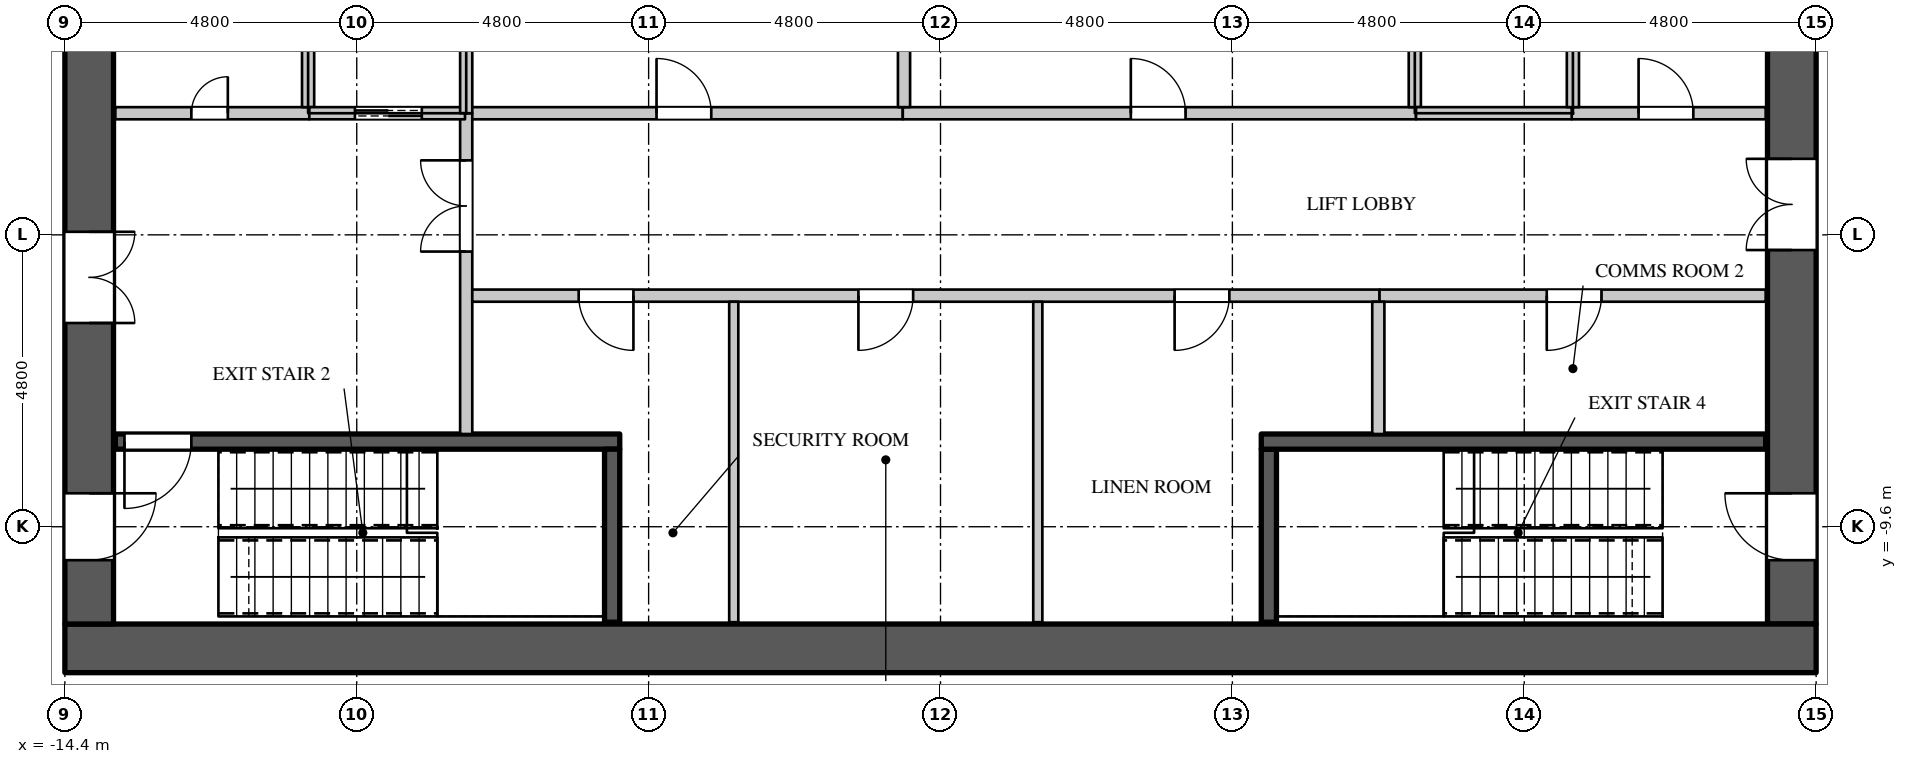
"""IFC4 building model, lengths in metres.
Left out: names, types, materials, properties, quantities, classifications, styles, units other than length and angle.
Written with IfcOpenShell. Run it as: python <this file> out.ifc"""

import sys

from ifc_helpers import new_model, si_unit, direction, frame, frame_2d, origin, place, context, subcontext, project, spatial, rectangle, extrude, element, fill, save


model = new_model("IFC4")
c1 = context("Model", 3, precision=1e-05, world=origin(), true_north=direction((0.0, 1.0)))
c2 = subcontext(c1, "Body", "Model", "MODEL_VIEW")
j1 = project(units=[si_unit("LENGTHUNIT", "METRE"), si_unit("PLANEANGLEUNIT", "RADIAN")], contexts=[c1])
p1 = place(None, origin())
s1 = spatial("IfcSite", under=j1, at=p1, CompositionType="ELEMENT")
p2 = place(p1, origin())
s2 = spatial("IfcBuilding", under=s1, at=p2, CompositionType="ELEMENT")
p3 = place(p2, frame((0.0, 0.0, 119.1)))
s3 = spatial("IfcBuildingStorey", under=s2, at=p3, CompositionType="ELEMENT", Elevation=119.1)
p4 = place(p3, frame((-14.4, -11.6, 0.0), z_axis=(0.0, 0.0, 1.0), x_axis=(1.0, 0.0, 0.0)))
e1 = element("IfcWall", 1, at=p4, inside=s3, PredefinedType="SHEAR", context=c2, shape_type="SweptSolid", body=[
    extrude(rectangle(XDim=28.8, YDim=0.8, at=frame_2d((14.4, 0.0))), origin(), (0.0, 0.0, 1.0), 4.2),
])
p5 = place(p3, frame((14.0, -11.2, 0.0), z_axis=(0.0, 0.0, 1.0), x_axis=(0.0, 1.0, 0.0)))
e2 = element("IfcWall", 2, at=p5, inside=s3, PredefinedType="SHEAR", context=c2, shape_type="SweptSolid", body=[
    extrude(rectangle(XDim=22.4, YDim=0.8, at=frame_2d((11.2, 0.0))), origin(), (0.0, 0.0, 1.0), 4.2),
])
p6 = place(p5, frame((20.25, 0.0, 0.0)))
e3 = element("IfcOpeningElement", 3, at=p6, cuts=e2, PredefinedType="OPENING", context=c2, shape_type="SweptSolid", body=[
    extrude(rectangle(XDim=1.1, YDim=2.2, at=frame_2d((0.55, 1.1))), frame((0.0, 0.41, 0.0), z_axis=(0.0, -1.0, 0.0), x_axis=(1.0, 0.0, 0.0)), (0.0, 0.0, 1.0), 0.82),
])
p7 = place(p5, frame((1.05, 0.0, 0.0)))
e4 = element("IfcOpeningElement", 4, at=p7, cuts=e2, PredefinedType="OPENING", context=c2, shape_type="SweptSolid", body=[
    extrude(rectangle(XDim=1.1, YDim=2.2, at=frame_2d((0.55, 1.1))), frame((0.0, 0.41, 0.0), z_axis=(0.0, -1.0, 0.0), x_axis=(1.0, 0.0, 0.0)), (0.0, 0.0, 1.0), 0.82),
])
p8 = place(p5, frame((14.75, 0.0, 0.0)))
e5 = element("IfcOpeningElement", 5, at=p8, cuts=e2, PredefinedType="OPENING", context=c2, shape_type="SweptSolid", body=[
    extrude(rectangle(XDim=1.5, YDim=2.4, at=frame_2d((0.75, 1.2))), frame((0.0, 0.41, 0.0), z_axis=(0.0, -1.0, 0.0), x_axis=(1.0, 0.0, 0.0)), (0.0, 0.0, 1.0), 0.82),
])
p9 = place(p5, frame((6.15, 0.0, 0.0)))
e6 = element("IfcOpeningElement", 6, at=p9, cuts=e2, PredefinedType="OPENING", context=c2, shape_type="SweptSolid", body=[
    extrude(rectangle(XDim=1.5, YDim=2.4, at=frame_2d((0.75, 1.2))), frame((0.0, 0.41, 0.0), z_axis=(0.0, -1.0, 0.0), x_axis=(1.0, 0.0, 0.0)), (0.0, 0.0, 1.0), 0.82),
])
p10 = place(p3, frame((-14.0, -11.2, 0.0), z_axis=(0.0, 0.0, 1.0), x_axis=(0.0, 1.0, 0.0)))
e7 = element("IfcWall", 7, at=p10, inside=s3, PredefinedType="SHEAR", context=c2, shape_type="SweptSolid", body=[
    extrude(rectangle(XDim=22.4, YDim=0.8, at=frame_2d((11.2, 0.0))), origin(), (0.0, 0.0, 1.0), 4.2),
])
p11 = place(p10, frame((20.25, 0.0, 0.0)))
e8 = element("IfcOpeningElement", 8, at=p11, cuts=e7, PredefinedType="OPENING", context=c2, shape_type="SweptSolid", body=[
    extrude(rectangle(XDim=1.1, YDim=2.2, at=frame_2d((0.55, 1.1))), frame((0.0, 0.41, 0.0), z_axis=(0.0, -1.0, 0.0), x_axis=(1.0, 0.0, 0.0)), (0.0, 0.0, 1.0), 0.82),
])
p12 = place(p10, frame((1.05, 0.0, 0.0)))
e9 = element("IfcOpeningElement", 9, at=p12, cuts=e7, PredefinedType="OPENING", context=c2, shape_type="SweptSolid", body=[
    extrude(rectangle(XDim=1.1, YDim=2.2, at=frame_2d((0.55, 1.1))), frame((0.0, 0.41, 0.0), z_axis=(0.0, -1.0, 0.0), x_axis=(1.0, 0.0, 0.0)), (0.0, 0.0, 1.0), 0.82),
])
p13 = place(p10, frame((15.95, 0.0, 0.0)))
e10 = element("IfcOpeningElement", 10, at=p13, cuts=e7, PredefinedType="OPENING", context=c2, shape_type="SweptSolid", body=[
    extrude(rectangle(XDim=1.5, YDim=2.4, at=frame_2d((0.75, 1.2))), frame((0.0, 0.41, 0.0), z_axis=(0.0, -1.0, 0.0), x_axis=(1.0, 0.0, 0.0)), (0.0, 0.0, 1.0), 0.82),
])
p14 = place(p10, frame((4.95, 0.0, 0.0)))
e11 = element("IfcOpeningElement", 11, at=p14, cuts=e7, PredefinedType="OPENING", context=c2, shape_type="SweptSolid", body=[
    extrude(rectangle(XDim=1.5, YDim=2.4, at=frame_2d((0.75, 1.2))), frame((0.0, 0.41, 0.0), z_axis=(0.0, -1.0, 0.0), x_axis=(1.0, 0.0, 0.0)), (0.0, 0.0, 1.0), 0.82),
])
p15 = place(p3, frame((-7.82, -2.8, 0.0), z_axis=(0.0, 0.0, 1.0), x_axis=(1.0, 0.0, 0.0)))
e12 = element("IfcWall", 12, at=p15, inside=s3, PredefinedType="PARTITIONING", context=c2, shape_type="SweptSolid", body=[
    extrude(rectangle(XDim=7.2, YDim=0.2, at=frame_2d((3.6, 0.0))), origin(), (0.0, 0.0, 1.0), 3.95),
])
p16 = place(p15, frame((3.15, 0.0, 0.0)))
e13 = element("IfcOpeningElement", 13, at=p16, cuts=e12, PredefinedType="OPENING", context=c2, shape_type="SweptSolid", body=[
    extrude(rectangle(XDim=0.9, YDim=2.2, at=frame_2d((0.45, 1.1))), frame((0.0, 0.11, 0.0), z_axis=(0.0, -1.0, 0.0), x_axis=(1.0, 0.0, 0.0)), (0.0, 0.0, 1.0), 0.22),
])
p17 = place(p3, frame((-7.8, -8.075, 0.0), z_axis=(0.0, 0.0, 1.0), x_axis=(0.0, 1.0, 0.0)))
e14 = element("IfcWall", 14, at=p17, inside=s3, PredefinedType="PARTITIONING", context=c2, shape_type="SweptSolid", body=[
    extrude(rectangle(XDim=5.275, YDim=0.2, at=frame_2d((2.637, 0.0))), origin(), (0.0, 0.0, 1.0), 3.95),
])
p18 = place(p17, frame((3.0, 0.0, 0.0)))
e15 = element("IfcOpeningElement", 15, at=p18, cuts=e14, PredefinedType="OPENING", context=c2, shape_type="SweptSolid", body=[
    extrude(rectangle(XDim=1.5, YDim=2.4, at=frame_2d((0.75, 1.2))), frame((0.0, 0.11, 0.0), z_axis=(0.0, -1.0, 0.0), x_axis=(1.0, 0.0, 0.0)), (0.0, 0.0, 1.0), 0.22),
])
p19 = place(p3, frame((-7.7, -5.8, 0.0), z_axis=(0.0, 0.0, 1.0), x_axis=(1.0, 0.0, 0.0)))
e16 = element("IfcWall", 16, at=p19, inside=s3, PredefinedType="PARTITIONING", context=c2, shape_type="SweptSolid", body=[
    extrude(rectangle(XDim=14.92, YDim=0.2, at=frame_2d((7.46, 0.0))), origin(), (0.0, 0.0, 1.0), 3.95),
])
p20 = place(p19, frame((1.75, 0.0, 0.0)))
e17 = element("IfcOpeningElement", 17, at=p20, cuts=e16, PredefinedType="OPENING", context=c2, shape_type="SweptSolid", body=[
    extrude(rectangle(XDim=0.9, YDim=2.2, at=frame_2d((0.45, 1.1))), frame((0.0, 0.11, 0.0), z_axis=(0.0, -1.0, 0.0), x_axis=(1.0, 0.0, 0.0)), (0.0, 0.0, 1.0), 0.22),
])
p21 = place(p19, frame((6.35, 0.0, 0.0)))
e18 = element("IfcOpeningElement", 18, at=p21, cuts=e16, PredefinedType="OPENING", context=c2, shape_type="SweptSolid", body=[
    extrude(rectangle(XDim=0.9, YDim=2.2, at=frame_2d((0.45, 1.1))), frame((0.0, 0.11, 0.0), z_axis=(0.0, -1.0, 0.0), x_axis=(1.0, 0.0, 0.0)), (0.0, 0.0, 1.0), 0.22),
])
p22 = place(p19, frame((11.55, 0.0, 0.0)))
e19 = element("IfcOpeningElement", 19, at=p22, cuts=e16, PredefinedType="OPENING", context=c2, shape_type="SweptSolid", body=[
    extrude(rectangle(XDim=0.9, YDim=2.2, at=frame_2d((0.45, 1.1))), frame((0.0, 0.11, 0.0), z_axis=(0.0, -1.0, 0.0), x_axis=(1.0, 0.0, 0.0)), (0.0, 0.0, 1.0), 0.22),
])
for number, where, z_axis, x_axis in (
    (20, (-3.4, -11.17, 0.0), (0.0, 0.0, 1.0), (0.0, 1.0, 0.0)),
    (21, (1.6, -11.17, 0.0), (0.0, 0.0, 1.0), (0.0, 1.0, 0.0)),
):
    element("IfcWall", number, at=place(p3, frame(where, z_axis=z_axis, x_axis=x_axis)), inside=s3, PredefinedType="PARTITIONING", context=c2, shape_type="SweptSolid", body=[
        extrude(rectangle(XDim=5.27, YDim=0.15, at=frame_2d((2.635, 0.0))), origin(), (0.0, 0.0, 1.0), 3.95),
    ])
p23 = place(p3, frame((-13.57, -2.8, 0.0), z_axis=(0.0, 0.0, 1.0), x_axis=(1.0, 0.0, 0.0)))
e22 = element("IfcWall", 22, at=p23, inside=s3, PredefinedType="PARTITIONING", context=c2, shape_type="SweptSolid", body=[
    extrude(rectangle(XDim=3.19, YDim=0.2, at=frame_2d((1.595, 0.0))), origin(), (0.0, 0.0, 1.0), 3.95),
])
p24 = place(p23, frame((1.25, 0.0, 0.0)))
e23 = element("IfcOpeningElement", 23, at=p24, cuts=e22, PredefinedType="OPENING", context=c2, shape_type="SweptSolid", body=[
    extrude(rectangle(XDim=0.6, YDim=2.0, at=frame_2d((0.3, 1.0))), frame((0.0, 0.11, 0.0), z_axis=(0.0, -1.0, 0.0), x_axis=(1.0, 0.0, 0.0)), (0.0, 0.0, 1.0), 0.22),
])
p25 = place(p3, frame((-0.62, -2.8, 0.0), z_axis=(0.0, 0.0, 1.0), x_axis=(1.0, 0.0, 0.0)))
e24 = element("IfcWall", 24, at=p25, inside=s3, PredefinedType="PARTITIONING", context=c2, shape_type="SweptSolid", body=[
    extrude(rectangle(XDim=8.44, YDim=0.2, at=frame_2d((4.22, 0.0))), origin(), (0.0, 0.0, 1.0), 3.95),
])
p26 = place(p25, frame((3.75, 0.0, 0.0)))
e25 = element("IfcOpeningElement", 25, at=p26, cuts=e24, PredefinedType="OPENING", context=c2, shape_type="SweptSolid", body=[
    extrude(rectangle(XDim=0.9, YDim=2.2, at=frame_2d((0.45, 1.1))), frame((0.0, 0.11, 0.0), z_axis=(0.0, -1.0, 0.0), x_axis=(1.0, 0.0, 0.0)), (0.0, 0.0, 1.0), 0.22),
])
p27 = place(p3, frame((-0.6, -2.7, 0.0), z_axis=(0.0, 0.0, 1.0), x_axis=(0.0, 1.0, 0.0)))
e26 = element("IfcWall", 26, at=p27, inside=s3, PredefinedType="PARTITIONING", context=c2, shape_type="SweptSolid", body=[
    extrude(rectangle(XDim=2.6, YDim=0.2, at=frame_2d((1.3, 0.0))), origin(), (0.0, 0.0, 1.0), 3.95),
])
p28 = place(p3, frame((7.22, -5.8, 0.0), z_axis=(0.0, 0.0, 1.0), x_axis=(1.0, 0.0, 0.0)))
e27 = element("IfcWall", 27, at=p28, inside=s3, PredefinedType="PARTITIONING", context=c2, shape_type="SweptSolid", body=[
    extrude(rectangle(XDim=6.35, YDim=0.2, at=frame_2d((3.175, 0.0))), origin(), (0.0, 0.0, 1.0), 3.95),
])
p29 = place(p28, frame((2.75, 0.0, 0.0)))
e28 = element("IfcOpeningElement", 28, at=p29, cuts=e27, PredefinedType="OPENING", context=c2, shape_type="SweptSolid", body=[
    extrude(rectangle(XDim=0.9, YDim=2.2, at=frame_2d((0.45, 1.1))), frame((0.0, 0.11, 0.0), z_axis=(0.0, -1.0, 0.0), x_axis=(1.0, 0.0, 0.0)), (0.0, 0.0, 1.0), 0.22),
])
p30 = place(p3, frame((7.2, -8.075, 0.0), z_axis=(0.0, 0.0, 1.0), x_axis=(0.0, 1.0, 0.0)))
e29 = element("IfcWall", 29, at=p30, inside=s3, PredefinedType="PARTITIONING", context=c2, shape_type="SweptSolid", body=[
    extrude(rectangle(XDim=2.175, YDim=0.2, at=frame_2d((1.087, 0.0))), origin(), (0.0, 0.0, 1.0), 3.95),
])
p31 = place(p3, frame((10.38, -2.8, 0.0), z_axis=(0.0, 0.0, 1.0), x_axis=(1.0, 0.0, 0.0)))
e30 = element("IfcWall", 30, at=p31, inside=s3, PredefinedType="PARTITIONING", context=c2, shape_type="SweptSolid", body=[
    extrude(rectangle(XDim=3.19, YDim=0.2, at=frame_2d((1.595, 0.0))), origin(), (0.0, 0.0, 1.0), 3.95),
])
p32 = place(p31, frame((1.1, 0.0, 0.0)))
e31 = element("IfcOpeningElement", 31, at=p32, cuts=e30, PredefinedType="OPENING", context=c2, shape_type="SweptSolid", body=[
    extrude(rectangle(XDim=0.9, YDim=2.2, at=frame_2d((0.45, 1.1))), frame((0.0, 0.11, 0.0), z_axis=(0.0, -1.0, 0.0), x_axis=(1.0, 0.0, 0.0)), (0.0, 0.0, 1.0), 0.22),
])
p33 = place(p3, frame((-10.4, -2.7, 0.0), z_axis=(0.0, 0.0, 1.0), x_axis=(0.0, 1.0, 0.0)))
e32 = element("IfcWall", 32, at=p33, inside=s3, PredefinedType="PARTITIONING", context=c2, shape_type="SweptSolid", body=[
    extrude(rectangle(XDim=2.7, YDim=0.2, at=frame_2d((1.35, 0.0))), origin(), (0.0, 0.0, 1.0), 3.95),
])
p34 = place(p3, frame((-10.38, -2.8, 0.0), z_axis=(0.0, 0.0, 1.0), x_axis=(1.0, 0.0, 0.0)))
e33 = element("IfcWall", 33, at=p34, inside=s3, PredefinedType="PARTITIONING", context=c2, shape_type="SweptSolid", body=[
    extrude(rectangle(XDim=2.56, YDim=0.2, at=frame_2d((1.28, 0.0))), origin(), (0.0, 0.0, 1.0), 3.95),
])
p35 = place(p34, frame((0.75, 0.0, 0.0)))
e34 = element("IfcOpeningElement", 34, at=p35, cuts=e33, PredefinedType="OPENING", context=c2, shape_type="SweptSolid", body=[
    extrude(rectangle(XDim=1.1, YDim=2.2, at=frame_2d((0.55, 1.1))), frame((0.0, 0.11, 0.0), z_axis=(0.0, -1.0, 0.0), x_axis=(1.0, 0.0, 0.0)), (0.0, 0.0, 1.0), 0.22),
])
p36 = place(p3, frame((-7.8, -2.8, 0.0), z_axis=(0.0, 0.0, 1.0), x_axis=(0.0, 1.0, 0.0)))
e35 = element("IfcWall", 35, at=p36, inside=s3, PredefinedType="PARTITIONING", context=c2, shape_type="SweptSolid", body=[
    extrude(rectangle(XDim=2.8, YDim=0.2, at=frame_2d((1.4, 0.0))), origin(), (0.0, 0.0, 1.0), 3.95),
])
p37 = place(p3, frame((7.8, -2.7, 0.0), z_axis=(0.0, 0.0, 1.0), x_axis=(0.0, 1.0, 0.0)))
e36 = element("IfcWall", 36, at=p37, inside=s3, PredefinedType="PARTITIONING", context=c2, shape_type="SweptSolid", body=[
    extrude(rectangle(XDim=2.7, YDim=0.2, at=frame_2d((1.35, 0.0))), origin(), (0.0, 0.0, 1.0), 3.95),
])
p38 = place(p3, frame((7.82, -2.8, 0.0), z_axis=(0.0, 0.0, 1.0), x_axis=(1.0, 0.0, 0.0)))
e37 = element("IfcWall", 37, at=p38, inside=s3, PredefinedType="PARTITIONING", context=c2, shape_type="SweptSolid", body=[
    extrude(rectangle(XDim=2.56, YDim=0.2, at=frame_2d((1.28, 0.0))), origin(), (0.0, 0.0, 1.0), 3.95),
])
p39 = place(p3, frame((10.4, -2.7, 0.0), z_axis=(0.0, 0.0, 1.0), x_axis=(0.0, 1.0, 0.0)))
e38 = element("IfcWall", 38, at=p39, inside=s3, PredefinedType="PARTITIONING", context=c2, shape_type="SweptSolid", body=[
    extrude(rectangle(XDim=5.4, YDim=0.2, at=frame_2d((2.7, 0.0))), origin(), (0.0, 0.0, 1.0), 3.95),
])
p40 = place(p3, frame((-13.57, -8.2, 0.0), z_axis=(0.0, 0.0, 1.0), x_axis=(1.0, 0.0, 0.0)))
e39 = element("IfcWall", 39, at=p40, inside=s3, PredefinedType="SHEAR", context=c2, shape_type="SweptSolid", body=[
    extrude(rectangle(XDim=8.295, YDim=0.25, at=frame_2d((4.147, 0.0))), origin(), (0.0, 0.0, 1.0), 3.95),
])
p41 = place(p40, frame((0.15, 0.0, 0.0)))
e40 = element("IfcOpeningElement", 40, at=p41, cuts=e39, PredefinedType="OPENING", context=c2, shape_type="SweptSolid", body=[
    extrude(rectangle(XDim=1.1, YDim=2.2, at=frame_2d((0.55, 1.1))), frame((0.0, 0.135, 0.0), z_axis=(0.0, -1.0, 0.0), x_axis=(1.0, 0.0, 0.0)), (0.0, 0.0, 1.0), 0.27),
])
for number, where, z_axis, x_axis in (
    (41, (-5.4, -11.17, 0.0), (0.0, 0.0, 1.0), (0.0, 1.0, 0.0)),
    (42, (5.4, -11.17, 0.0), (0.0, 0.0, 1.0), (0.0, 1.0, 0.0)),
):
    element("IfcWall", number, at=place(p3, frame(where, z_axis=z_axis, x_axis=x_axis)), inside=s3, PredefinedType="SHEAR", context=c2, shape_type="SweptSolid", body=[
        extrude(rectangle(XDim=2.845, YDim=0.25, at=frame_2d((1.422, 0.0))), origin(), (0.0, 0.0, 1.0), 3.95),
    ])
p42 = place(p3, frame((5.275, -8.2, 0.0), z_axis=(0.0, 0.0, 1.0), x_axis=(1.0, 0.0, 0.0)))
e43 = element("IfcWall", 43, at=p42, inside=s3, PredefinedType="SHEAR", context=c2, shape_type="SweptSolid", body=[
    extrude(rectangle(XDim=8.295, YDim=0.25, at=frame_2d((4.147, 0.0))), origin(), (0.0, 0.0, 1.0), 3.95),
])
p43 = place(p24, origin())
e44 = element("IfcDoor", 44, at=p43, inside=s3, OperationType="SINGLE_SWING_RIGHT", PredefinedType="DOOR", context=c2, shape_type="SweptSolid", body=[
    extrude(rectangle(XDim=0.6, YDim=2.0, at=frame_2d((0.3, 1.0))), frame((0.0, 0.025, 0.0), z_axis=(0.0, -1.0, 0.0), x_axis=(1.0, 0.0, 0.0)), (0.0, 0.0, 1.0), 0.05),
])
fill(e23, e44)
p44 = place(p32, origin())
e45 = element("IfcDoor", 45, at=p44, inside=s3, OperationType="SINGLE_SWING_LEFT", PredefinedType="DOOR", context=c2, shape_type="SweptSolid", body=[
    extrude(rectangle(XDim=0.9, YDim=2.2, at=frame_2d((0.45, 1.1))), frame((0.0, 0.025, 0.0), z_axis=(0.0, -1.0, 0.0), x_axis=(1.0, 0.0, 0.0)), (0.0, 0.0, 1.0), 0.05),
])
fill(e31, e45)
p45 = place(p20, origin())
e46 = element("IfcDoor", 46, at=p45, inside=s3, OperationType="SINGLE_SWING_LEFT", PredefinedType="DOOR", context=c2, shape_type="SweptSolid", body=[
    extrude(rectangle(XDim=0.9, YDim=2.2, at=frame_2d((0.45, 1.1))), frame((0.0, 0.025, 0.0), z_axis=(0.0, -1.0, 0.0), x_axis=(1.0, 0.0, 0.0)), (0.0, 0.0, 1.0), 0.05),
])
fill(e17, e46)
p46 = place(p21, origin())
e47 = element("IfcDoor", 47, at=p46, inside=s3, OperationType="SINGLE_SWING_RIGHT", PredefinedType="DOOR", context=c2, shape_type="SweptSolid", body=[
    extrude(rectangle(XDim=0.9, YDim=2.2, at=frame_2d((0.45, 1.1))), frame((0.0, 0.025, 0.0), z_axis=(0.0, -1.0, 0.0), x_axis=(1.0, 0.0, 0.0)), (0.0, 0.0, 1.0), 0.05),
])
fill(e18, e47)
p47 = place(p22, origin())
e48 = element("IfcDoor", 48, at=p47, inside=s3, OperationType="SINGLE_SWING_RIGHT", PredefinedType="DOOR", context=c2, shape_type="SweptSolid", body=[
    extrude(rectangle(XDim=0.9, YDim=2.2, at=frame_2d((0.45, 1.1))), frame((0.0, 0.025, 0.0), z_axis=(0.0, -1.0, 0.0), x_axis=(1.0, 0.0, 0.0)), (0.0, 0.0, 1.0), 0.05),
])
fill(e19, e48)
p48 = place(p29, origin())
e49 = element("IfcDoor", 49, at=p48, inside=s3, OperationType="SINGLE_SWING_RIGHT", PredefinedType="DOOR", context=c2, shape_type="SweptSolid", body=[
    extrude(rectangle(XDim=0.9, YDim=2.2, at=frame_2d((0.45, 1.1))), frame((0.0, 0.025, 0.0), z_axis=(0.0, -1.0, 0.0), x_axis=(1.0, 0.0, 0.0)), (0.0, 0.0, 1.0), 0.05),
])
fill(e28, e49)
p49 = place(p16, origin())
e50 = element("IfcDoor", 50, at=p49, inside=s3, OperationType="SINGLE_SWING_LEFT", PredefinedType="DOOR", context=c2, shape_type="SweptSolid", body=[
    extrude(rectangle(XDim=0.9, YDim=2.2, at=frame_2d((0.45, 1.1))), frame((0.0, 0.025, 0.0), z_axis=(0.0, -1.0, 0.0), x_axis=(1.0, 0.0, 0.0)), (0.0, 0.0, 1.0), 0.05),
])
fill(e13, e50)
p50 = place(p26, origin())
e51 = element("IfcDoor", 51, at=p50, inside=s3, OperationType="SINGLE_SWING_LEFT", PredefinedType="DOOR", context=c2, shape_type="SweptSolid", body=[
    extrude(rectangle(XDim=0.9, YDim=2.2, at=frame_2d((0.45, 1.1))), frame((0.0, 0.025, 0.0), z_axis=(0.0, -1.0, 0.0), x_axis=(1.0, 0.0, 0.0)), (0.0, 0.0, 1.0), 0.05),
])
fill(e25, e51)
p51 = place(p35, origin())
e52 = element("IfcDoor", 52, at=p51, inside=s3, OperationType="DOUBLE_DOOR_SLIDING", PredefinedType="DOOR", context=c2, shape_type="SweptSolid", body=[
    extrude(rectangle(XDim=1.1, YDim=2.2, at=frame_2d((0.55, 1.1))), frame((0.0, 0.025, 0.0), z_axis=(0.0, -1.0, 0.0), x_axis=(1.0, 0.0, 0.0)), (0.0, 0.0, 1.0), 0.05),
])
fill(e34, e52)
p52 = place(p41, origin())
e53 = element("IfcDoor", 53, at=p52, inside=s3, OperationType="SINGLE_SWING_RIGHT", PredefinedType="DOOR", context=c2, shape_type="SweptSolid", body=[
    extrude(rectangle(XDim=1.1, YDim=2.2, at=frame_2d((0.55, 1.1))), frame((0.0, 0.025, 0.0), z_axis=(0.0, -1.0, 0.0), x_axis=(1.0, 0.0, 0.0)), (0.0, 0.0, 1.0), 0.05),
])
fill(e40, e53)
p53 = place(p18, origin())
e54 = element("IfcDoor", 54, at=p53, inside=s3, OperationType="DOUBLE_DOOR_SINGLE_SWING", PredefinedType="DOOR", context=c2, shape_type="SweptSolid", body=[
    extrude(rectangle(XDim=1.5, YDim=2.4, at=frame_2d((0.75, 1.2))), frame((0.0, 0.025, 0.0), z_axis=(0.0, -1.0, 0.0), x_axis=(1.0, 0.0, 0.0)), (0.0, 0.0, 1.0), 0.05),
])
fill(e15, e54)
p54 = place(p12, origin())
e55 = element("IfcDoor", 55, at=p54, inside=s3, OperationType="SINGLE_SWING_LEFT", PredefinedType="DOOR", context=c2, shape_type="SweptSolid", body=[
    extrude(rectangle(XDim=1.1, YDim=2.2, at=frame_2d((0.55, 1.1))), frame((0.0, -0.345, 0.0), z_axis=(0.0, -1.0, 0.0), x_axis=(1.0, 0.0, 0.0)), (0.0, 0.0, 1.0), 0.05),
])
fill(e9, e55)
p55 = place(p7, origin())
e56 = element("IfcDoor", 56, at=p55, inside=s3, OperationType="SINGLE_SWING_RIGHT", PredefinedType="DOOR", context=c2, shape_type="SweptSolid", body=[
    extrude(rectangle(XDim=1.1, YDim=2.2, at=frame_2d((0.55, 1.1))), frame((0.0, 0.395, 0.0), z_axis=(0.0, -1.0, 0.0), x_axis=(1.0, 0.0, 0.0)), (0.0, 0.0, 1.0), 0.05),
])
fill(e4, e56)
p56 = place(p14, origin())
e57 = element("IfcDoor", 57, at=p56, inside=s3, OperationType="DOUBLE_DOOR_SINGLE_SWING", PredefinedType="DOOR", context=c2, shape_type="SweptSolid", body=[
    extrude(rectangle(XDim=1.5, YDim=2.4, at=frame_2d((0.75, 1.2))), frame((0.0, -0.345, 0.0), z_axis=(0.0, -1.0, 0.0), x_axis=(1.0, 0.0, 0.0)), (0.0, 0.0, 1.0), 0.05),
])
fill(e11, e57)
p57 = place(p9, origin())
e58 = element("IfcDoor", 58, at=p57, inside=s3, OperationType="DOUBLE_DOOR_SINGLE_SWING", PredefinedType="DOOR", context=c2, shape_type="SweptSolid", body=[
    extrude(rectangle(XDim=1.5, YDim=2.4, at=frame_2d((0.75, 1.2))), frame((0.0, 0.395, 0.0), z_axis=(0.0, -1.0, 0.0), x_axis=(1.0, 0.0, 0.0)), (0.0, 0.0, 1.0), 0.05),
])
fill(e6, e58)
save(model, sys.argv[1])
